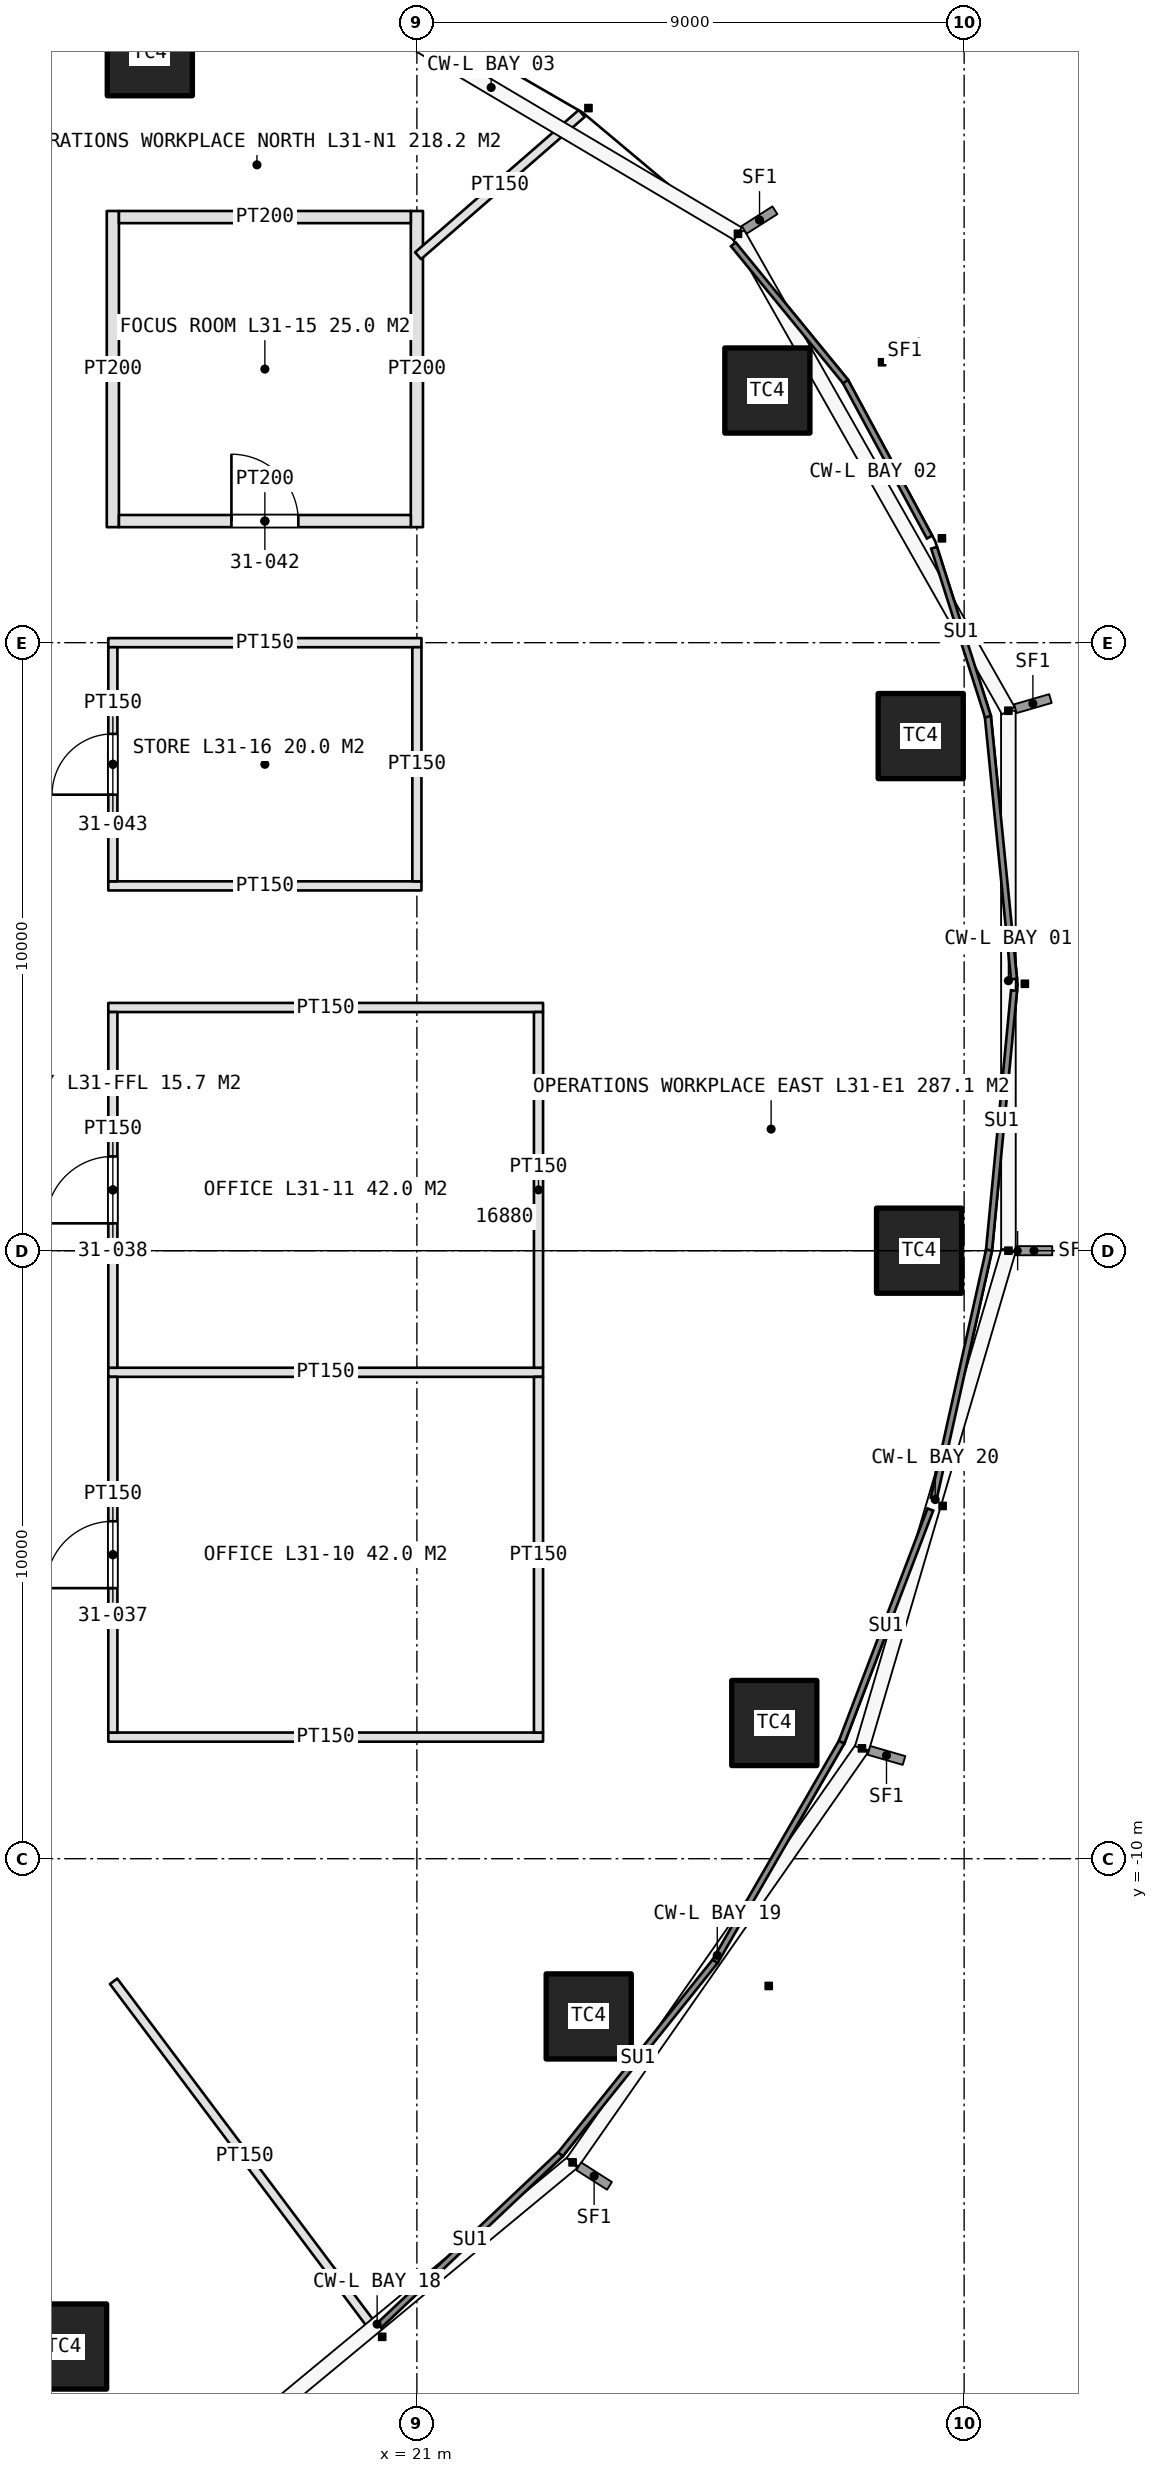
"""IFC4 building model, lengths in metres.
Left out: names, types, materials, properties, quantities, classifications, styles, units other than length and angle.
Written with IfcOpenShell. Run it as: python <this file> out.ifc"""

import sys

from ifc_helpers import new_model, si_unit, direction, frame, frame_2d, origin, origin_2d, place, context, subcontext, project, spatial, rectangle, extrude, element, fill, save


model = new_model("IFC4")
c1 = context("Model", 3, precision=1e-05, world=origin(), true_north=direction((0.0, 1.0)))
c2 = subcontext(c1, "Body", "Model", "MODEL_VIEW")
j1 = project(units=[si_unit("LENGTHUNIT", "METRE"), si_unit("PLANEANGLEUNIT", "RADIAN")], contexts=[c1])
p1 = place(None, origin())
s1 = spatial("IfcSite", under=j1, at=p1, CompositionType="ELEMENT")
p2 = place(p1, origin())
s2 = spatial("IfcBuilding", under=s1, at=p2, CompositionType="ELEMENT")
p3 = place(p2, frame((0.0, 0.0, 147.0)))
s3 = spatial("IfcBuildingStorey", under=s2, at=p3, CompositionType="ELEMENT", Elevation=147.0)
for number, where, z_axis, x_axis in (
    (1, (29.259, 0.0, 0.0), (0.0, 0.0, 1.0), (1.0, 0.0, 0.0)),
    (2, (29.286, 8.464, 0.0), (0.0, 0.0, 1.0), (1.0, 0.0, 0.0)),
    (3, (26.764, 14.147, 0.0), (0.0, 0.0, 1.0), (1.0, 0.0, 0.0)),
    (4, (16.608, 19.695, 0.0), (0.0, 0.0, 1.0), (1.0, 0.0, 0.0)),
    (5, (15.198, -18.023, 0.0), (0.0, 0.0, 1.0), (1.0, 0.0, 0.0)),
    (6, (23.826, -12.594, 0.0), (0.0, 0.0, 1.0), (1.0, 0.0, 0.0)),
    (7, (26.878, -7.768, 0.0), (0.0, 0.0, 1.0), (1.0, 0.0, 0.0)),
):
    element("IfcColumn", number, at=place(p3, frame(where, z_axis=z_axis, x_axis=x_axis)), inside=s3, PredefinedType="COLUMN", context=c2, shape_type="SweptSolid", body=[
        extrude(rectangle(XDim=1.4, YDim=1.4, at=origin_2d()), origin(), (0.0, 0.0, 1.0), 4.2),
    ])
for number, where, z_axis, x_axis in (
    (8, (15.925, -8.0, 0.0), (0.0, 0.0, 1.0), (1.0, 0.0, 0.0)),
    (9, (15.925, -2.0, 0.0), (0.0, 0.0, 1.0), (1.0, 0.0, 0.0)),
    (10, (15.925, 4.0, 0.0), (0.0, 0.0, 1.0), (1.0, 0.0, 0.0)),
):
    element("IfcWall", number, at=place(p3, frame(where, z_axis=z_axis, x_axis=x_axis)), inside=s3, PredefinedType="PARTITIONING", context=c2, shape_type="SweptSolid", body=[
        extrude(rectangle(XDim=7.15, YDim=0.15, at=frame_2d((3.575, 0.0))), origin(), (0.0, 0.0, 1.0), 3.0),
    ])
p4 = place(p3, frame((16.0, -7.925, 0.0), z_axis=(0.0, 0.0, 1.0), x_axis=(0.0, 1.0, 0.0)))
e11 = element("IfcWall", 11, at=p4, inside=s3, PredefinedType="PARTITIONING", context=c2, shape_type="SweptSolid", body=[
    extrude(rectangle(XDim=5.85, YDim=0.15, at=frame_2d((2.925, 0.0))), origin(), (0.0, 0.0, 1.0), 3.0),
])
p5 = place(p4, frame((2.375, 0.0, 0.0)))
e12 = element("IfcOpeningElement", 12, at=p5, cuts=e11, PredefinedType="OPENING", context=c2, shape_type="SweptSolid", body=[
    extrude(rectangle(XDim=1.1, YDim=2.3, at=frame_2d((0.55, 1.15))), frame((0.0, 0.085, 0.0), z_axis=(0.0, -1.0, 0.0), x_axis=(1.0, 0.0, 0.0)), (0.0, 0.0, 1.0), 0.17),
])
p6 = place(p3, frame((23.0, -7.925, 0.0), z_axis=(0.0, 0.0, 1.0), x_axis=(0.0, 1.0, 0.0)))
e13 = element("IfcWall", 13, at=p6, inside=s3, PredefinedType="PARTITIONING", context=c2, shape_type="SweptSolid", body=[
    extrude(rectangle(XDim=5.85, YDim=0.15, at=frame_2d((2.925, 0.0))), origin(), (0.0, 0.0, 1.0), 3.0),
])
p7 = place(p3, frame((16.0, -1.925, 0.0), z_axis=(0.0, 0.0, 1.0), x_axis=(0.0, 1.0, 0.0)))
e14 = element("IfcWall", 14, at=p7, inside=s3, PredefinedType="PARTITIONING", context=c2, shape_type="SweptSolid", body=[
    extrude(rectangle(XDim=5.85, YDim=0.15, at=frame_2d((2.925, 0.0))), origin(), (0.0, 0.0, 1.0), 3.0),
])
p8 = place(p7, frame((2.375, 0.0, 0.0)))
e15 = element("IfcOpeningElement", 15, at=p8, cuts=e14, PredefinedType="OPENING", context=c2, shape_type="SweptSolid", body=[
    extrude(rectangle(XDim=1.1, YDim=2.3, at=frame_2d((0.55, 1.15))), frame((0.0, 0.085, 0.0), z_axis=(0.0, -1.0, 0.0), x_axis=(1.0, 0.0, 0.0)), (0.0, 0.0, 1.0), 0.17),
])
p9 = place(p3, frame((23.0, -1.925, 0.0), z_axis=(0.0, 0.0, 1.0), x_axis=(0.0, 1.0, 0.0)))
e16 = element("IfcWall", 16, at=p9, inside=s3, PredefinedType="PARTITIONING", context=c2, shape_type="SweptSolid", body=[
    extrude(rectangle(XDim=5.85, YDim=0.15, at=frame_2d((2.925, 0.0))), origin(), (0.0, 0.0, 1.0), 3.0),
])
for number, where, z_axis, x_axis in (
    (17, (16.0, 11.9, 0.0), (0.0, 0.0, 1.0), (0.0, 1.0, 0.0)),
    (18, (21.0, 11.9, 0.0), (0.0, 0.0, 1.0), (0.0, 1.0, 0.0)),
):
    element("IfcWall", number, at=place(p3, frame(where, z_axis=z_axis, x_axis=x_axis)), inside=s3, PredefinedType="PARTITIONING", context=c2, shape_type="SweptSolid", body=[
        extrude(rectangle(XDim=5.2, YDim=0.2, at=frame_2d((2.6, 0.0))), origin(), (0.0, 0.0, 1.0), 3.0),
    ])
p10 = place(p3, frame((16.1, 12.0, 0.0), z_axis=(0.0, 0.0, 1.0), x_axis=(1.0, 0.0, 0.0)))
e19 = element("IfcWall", 19, at=p10, inside=s3, PredefinedType="PARTITIONING", context=c2, shape_type="SweptSolid", body=[
    extrude(rectangle(XDim=4.8, YDim=0.2, at=frame_2d((2.4, 0.0))), origin(), (0.0, 0.0, 1.0), 3.0),
])
p11 = place(p10, frame((1.85, 0.0, 0.0)))
e20 = element("IfcOpeningElement", 20, at=p11, cuts=e19, PredefinedType="OPENING", context=c2, shape_type="SweptSolid", body=[
    extrude(rectangle(XDim=1.1, YDim=2.3, at=frame_2d((0.55, 1.15))), frame((0.0, 0.11, 0.0), z_axis=(0.0, -1.0, 0.0), x_axis=(1.0, 0.0, 0.0)), (0.0, 0.0, 1.0), 0.22),
])
p12 = place(p3, frame((16.1, 17.0, 0.0), z_axis=(0.0, 0.0, 1.0), x_axis=(1.0, 0.0, 0.0)))
e21 = element("IfcWall", 21, at=p12, inside=s3, PredefinedType="PARTITIONING", context=c2, shape_type="SweptSolid", body=[
    extrude(rectangle(XDim=4.8, YDim=0.2, at=frame_2d((2.4, 0.0))), origin(), (0.0, 0.0, 1.0), 3.0),
])
for number, where, z_axis, x_axis in (
    (22, (15.925, 6.0, 0.0), (0.0, 0.0, 1.0), (1.0, 0.0, 0.0)),
    (23, (15.925, 10.0, 0.0), (0.0, 0.0, 1.0), (1.0, 0.0, 0.0)),
):
    element("IfcWall", number, at=place(p3, frame(where, z_axis=z_axis, x_axis=x_axis)), inside=s3, PredefinedType="PARTITIONING", context=c2, shape_type="SweptSolid", body=[
        extrude(rectangle(XDim=5.15, YDim=0.15, at=frame_2d((2.575, 0.0))), origin(), (0.0, 0.0, 1.0), 3.0),
    ])
p13 = place(p3, frame((16.0, 6.075, 0.0), z_axis=(0.0, 0.0, 1.0), x_axis=(0.0, 1.0, 0.0)))
e24 = element("IfcWall", 24, at=p13, inside=s3, PredefinedType="PARTITIONING", context=c2, shape_type="SweptSolid", body=[
    extrude(rectangle(XDim=3.85, YDim=0.15, at=frame_2d((1.925, 0.0))), origin(), (0.0, 0.0, 1.0), 3.0),
])
p14 = place(p13, frame((1.425, 0.0, 0.0)))
e25 = element("IfcOpeningElement", 25, at=p14, cuts=e24, PredefinedType="OPENING", context=c2, shape_type="SweptSolid", body=[
    extrude(rectangle(XDim=1.0, YDim=2.2, at=frame_2d((0.5, 1.1))), frame((0.0, 0.085, 0.0), z_axis=(0.0, -1.0, 0.0), x_axis=(1.0, 0.0, 0.0)), (0.0, 0.0, 1.0), 0.17),
])
p15 = place(p3, frame((21.0, 6.075, 0.0), z_axis=(0.0, 0.0, 1.0), x_axis=(0.0, 1.0, 0.0)))
e26 = element("IfcWall", 26, at=p15, inside=s3, PredefinedType="PARTITIONING", context=c2, shape_type="SweptSolid", body=[
    extrude(rectangle(XDim=3.85, YDim=0.15, at=frame_2d((1.925, 0.0))), origin(), (0.0, 0.0, 1.0), 3.0),
])
p16 = place(p3, frame((16.012, -12.016, 0.0), z_axis=(0.0, 0.0, 1.0), x_axis=(0.600059749679, -0.799955184254, 0.0)))
e27 = element("IfcWall", 27, at=p16, inside=s3, PredefinedType="PARTITIONING", context=c2, shape_type="SweptSolid", body=[
    extrude(rectangle(XDim=7.191, YDim=0.15, at=frame_2d((3.596, 0.0))), origin(), (0.0, 0.0, 1.0), 3.0),
])
p17 = place(p3, frame((21.02, 16.364, 0.0), z_axis=(0.0, 0.0, 1.0), x_axis=(0.75467183248, 0.656102450278, 0.0)))
e28 = element("IfcWall", 28, at=p17, inside=s3, PredefinedType="PARTITIONING", context=c2, shape_type="SweptSolid", body=[
    extrude(rectangle(XDim=3.567, YDim=0.15, at=frame_2d((1.783, 0.0))), origin(), (0.0, 0.0, 1.0), 3.0),
])
p18 = place(p5, origin())
e29 = element("IfcDoor", 29, at=p18, inside=s3, OperationType="SINGLE_SWING_LEFT", PredefinedType="DOOR", context=c2, shape_type="SweptSolid", body=[
    extrude(rectangle(XDim=1.1, YDim=2.3, at=frame_2d((0.55, 1.15))), frame((0.0, 0.025, 0.0), z_axis=(0.0, -1.0, 0.0), x_axis=(1.0, 0.0, 0.0)), (0.0, 0.0, 1.0), 0.05),
])
fill(e12, e29)
p19 = place(p8, origin())
e30 = element("IfcDoor", 30, at=p19, inside=s3, OperationType="SINGLE_SWING_LEFT", PredefinedType="DOOR", context=c2, shape_type="SweptSolid", body=[
    extrude(rectangle(XDim=1.1, YDim=2.3, at=frame_2d((0.55, 1.15))), frame((0.0, 0.025, 0.0), z_axis=(0.0, -1.0, 0.0), x_axis=(1.0, 0.0, 0.0)), (0.0, 0.0, 1.0), 0.05),
])
fill(e15, e30)
p20 = place(p11, origin())
e31 = element("IfcDoor", 31, at=p20, inside=s3, OperationType="SINGLE_SWING_LEFT", PredefinedType="DOOR", context=c2, shape_type="SweptSolid", body=[
    extrude(rectangle(XDim=1.1, YDim=2.3, at=frame_2d((0.55, 1.15))), frame((0.0, 0.025, 0.0), z_axis=(0.0, -1.0, 0.0), x_axis=(1.0, 0.0, 0.0)), (0.0, 0.0, 1.0), 0.05),
])
fill(e20, e31)
p21 = place(p14, origin())
e32 = element("IfcDoor", 32, at=p21, inside=s3, OperationType="SINGLE_SWING_LEFT", PredefinedType="DOOR", context=c2, shape_type="SweptSolid", body=[
    extrude(rectangle(XDim=1.0, YDim=2.2, at=frame_2d((0.5, 1.1))), frame((0.0, 0.025, 0.0), z_axis=(0.0, -1.0, 0.0), x_axis=(1.0, 0.0, 0.0)), (0.0, 0.0, 1.0), 0.05),
])
fill(e25, e32)
save(model, sys.argv[1])
